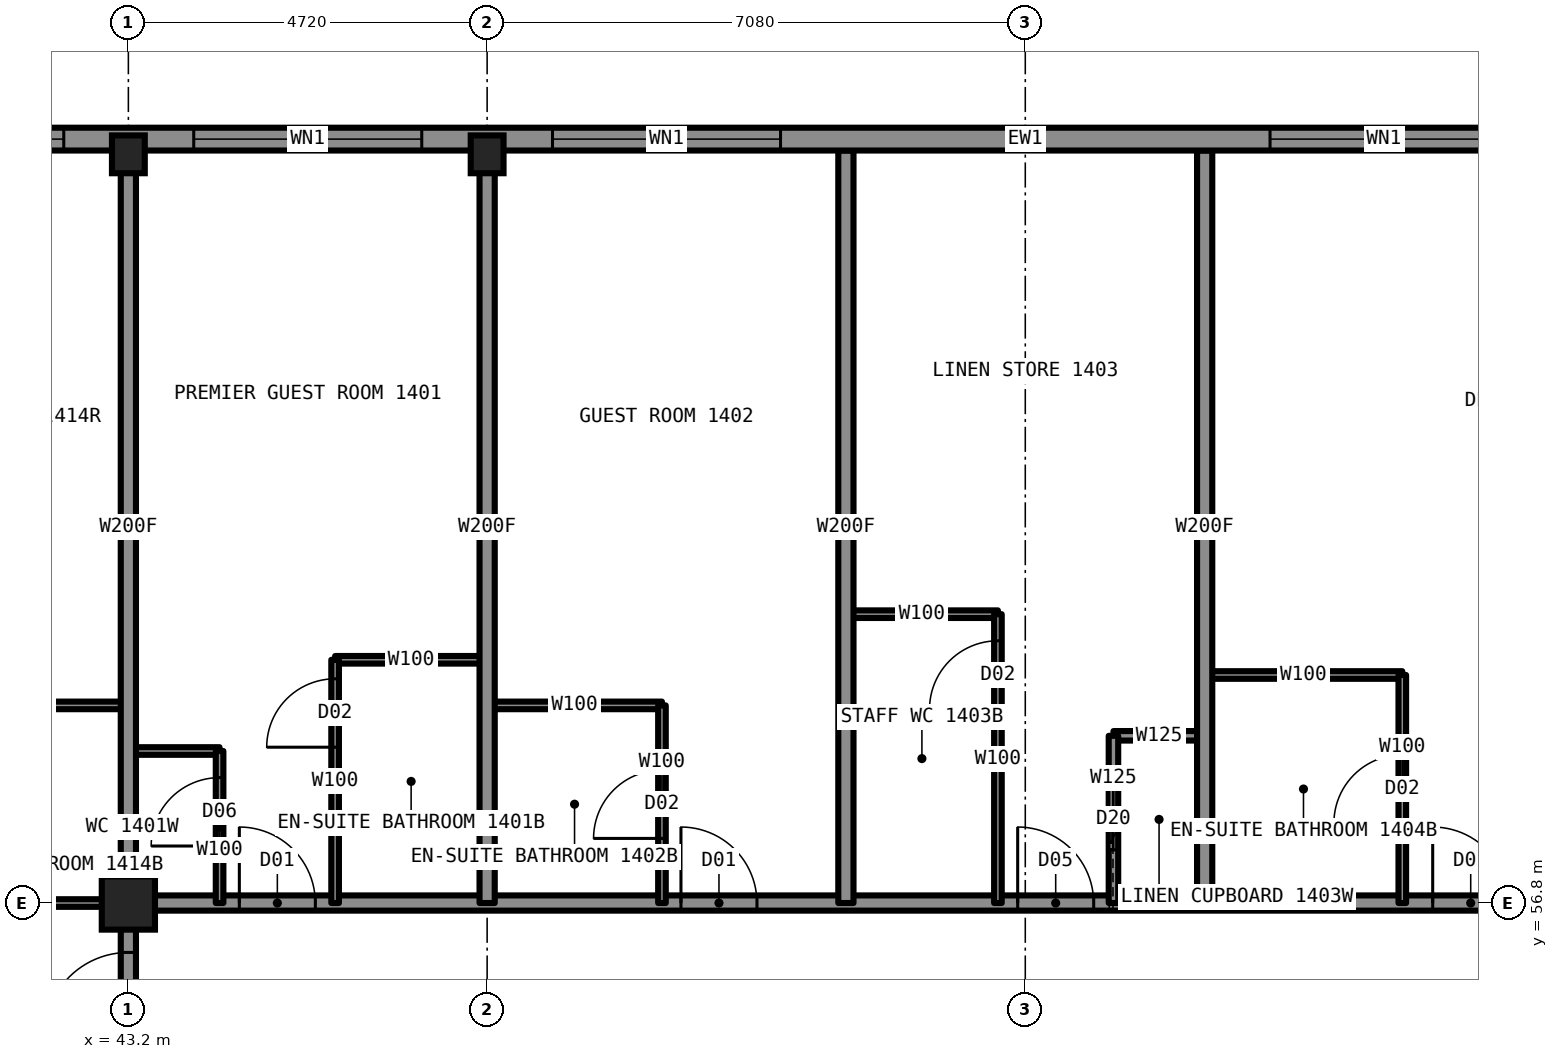
"""IFC4 building model, lengths in metres.
Left out: names, types, materials, properties, quantities, classifications, styles, units other than length and angle.
Written with IfcOpenShell. Run it as: python <this file> out.ifc"""

import sys

from ifc_helpers import new_model, si_unit, direction, frame, frame_2d, origin, origin_2d, place, context, subcontext, project, spatial, rectangle, hollow_rectangle, i_section, extrude, element, fill, save


model = new_model("IFC4")
c1 = context("Model", 3, precision=1e-05, world=origin(), true_north=direction((0.0, 1.0)))
c2 = subcontext(c1, "Body", "Model", "MODEL_VIEW")
j1 = project(units=[si_unit("LENGTHUNIT", "METRE"), si_unit("PLANEANGLEUNIT", "RADIAN")], contexts=[c1])
p1 = place(None, origin())
s1 = spatial("IfcSite", under=j1, at=p1, CompositionType="ELEMENT")
p2 = place(p1, origin())
s2 = spatial("IfcBuilding", under=s1, at=p2, CompositionType="ELEMENT")
p3 = place(p2, frame((0.0, 0.0, 49.5)))
s3 = spatial("IfcBuildingStorey", under=s2, at=p3, CompositionType="ELEMENT", Elevation=49.5)
for number, where, z_axis, x_axis in (
    (1, (43.2, 66.65, 0.0), (0.0, 0.0, 1.0), (1.0, 0.0, 0.0)),
    (2, (47.92, 66.65, 0.0), (0.0, 0.0, 1.0), (1.0, 0.0, 0.0)),
):
    element("IfcColumn", number, at=place(p3, frame(where, z_axis=z_axis, x_axis=x_axis)), inside=s3, PredefinedType="COLUMN", context=c2, shape_type="SweptSolid", body=[
        extrude(i_section(OverallWidth=0.432, OverallDepth=0.498, WebThickness=0.056, FlangeThickness=0.089, at=origin_2d()), origin(), (0.0, 0.0, 1.0), 3.5),
    ])
p4 = place(p3, frame((43.2, 56.8, 0.0), z_axis=(0.0, 0.0, 1.0), x_axis=(1.0, 0.0, 0.0)))
e3 = element("IfcColumn", 3, at=p4, inside=s3, PredefinedType="COLUMN", context=c2, shape_type="SweptSolid", body=[
    extrude(hollow_rectangle(XDim=0.7, YDim=0.7, WallThickness=0.06, at=origin_2d()), origin(), (0.0, 0.0, 1.0), 3.5),
])
p5 = place(p3, frame((40.6, 56.8, 0.0), z_axis=(0.0, 0.0, 1.0), x_axis=(1.0, 0.0, 0.0)))
e4 = element("IfcWall", 4, at=p5, inside=s3, PredefinedType="PARTITIONING", context=c2, shape_type="SweptSolid", body=[
    extrude(rectangle(XDim=2.6, YDim=0.1, at=frame_2d((1.3, 0.0))), origin(), (0.0, 0.0, 1.0), 2.573),
])
p6 = place(p3, frame((43.2, 56.8, 0.0), z_axis=(0.0, 0.0, 1.0), x_axis=(1.0, 0.0, 0.0)))
e5 = element("IfcWall", 5, at=p6, inside=s3, PredefinedType="PARTITIONING", context=c2, shape_type="SweptSolid", body=[
    extrude(rectangle(XDim=23.6, YDim=0.2, at=frame_2d((11.8, 0.0))), origin(), (0.0, 0.0, 1.0), 3.33),
])
p7 = place(p6, frame((1.46, 0.0, 0.0)))
e6 = element("IfcOpeningElement", 6, at=p7, cuts=e5, PredefinedType="OPENING", context=c2, shape_type="SweptSolid", body=[
    extrude(rectangle(XDim=1.0, YDim=2.2, at=frame_2d((0.5, 1.1))), frame((0.0, 0.11, 0.0), z_axis=(0.0, -1.0, 0.0), x_axis=(1.0, 0.0, 0.0)), (0.0, 0.0, 1.0), 0.22),
])
p8 = place(p6, frame((7.27, 0.0, 0.0)))
e7 = element("IfcOpeningElement", 7, at=p8, cuts=e5, PredefinedType="OPENING", context=c2, shape_type="SweptSolid", body=[
    extrude(rectangle(XDim=1.0, YDim=2.2, at=frame_2d((0.5, 1.1))), frame((0.0, 0.11, 0.0), z_axis=(0.0, -1.0, 0.0), x_axis=(1.0, 0.0, 0.0)), (0.0, 0.0, 1.0), 0.22),
])
p9 = place(p6, frame((11.7, 0.0, 0.0)))
e8 = element("IfcOpeningElement", 8, at=p9, cuts=e5, PredefinedType="OPENING", context=c2, shape_type="SweptSolid", body=[
    extrude(rectangle(XDim=1.0, YDim=2.2, at=frame_2d((0.5, 1.1))), frame((0.0, 0.11, 0.0), z_axis=(0.0, -1.0, 0.0), x_axis=(1.0, 0.0, 0.0)), (0.0, 0.0, 1.0), 0.22),
])
p10 = place(p6, frame((17.16, 0.0, 0.0)))
e9 = element("IfcOpeningElement", 9, at=p10, cuts=e5, PredefinedType="OPENING", context=c2, shape_type="SweptSolid", body=[
    extrude(rectangle(XDim=1.0, YDim=2.2, at=frame_2d((0.5, 1.1))), frame((0.0, 0.11, 0.0), z_axis=(0.0, -1.0, 0.0), x_axis=(1.0, 0.0, 0.0)), (0.0, 0.0, 1.0), 0.22),
])
p11 = place(p3, frame((43.2, 58.8, 0.0), z_axis=(0.0, 0.0, 1.0), x_axis=(1.0, 0.0, 0.0)))
e10 = element("IfcWall", 10, at=p11, inside=s3, PredefinedType="PARTITIONING", context=c2, shape_type="SweptSolid", body=[
    extrude(rectangle(XDim=1.2, YDim=0.1, at=frame_2d((0.6, 0.0))), origin(), (0.0, 0.0, 1.0), 3.33),
])
p12 = place(p3, frame((56.16, 59.0, 0.0), z_axis=(0.0, 0.0, 1.0), x_axis=(1.0, 0.0, 0.0)))
e11 = element("IfcWall", 11, at=p12, inside=s3, PredefinedType="PARTITIONING", context=c2, shape_type="SweptSolid", body=[
    extrude(rectangle(XDim=1.2, YDim=0.125, at=frame_2d((0.6, 0.0))), origin(), (0.0, 0.0, 1.0), 3.33),
])
p13 = place(p3, frame((40.6, 59.4, 0.0), z_axis=(0.0, 0.0, 1.0), x_axis=(1.0, 0.0, 0.0)))
e12 = element("IfcWall", 12, at=p13, inside=s3, PredefinedType="PARTITIONING", context=c2, shape_type="SweptSolid", body=[
    extrude(rectangle(XDim=2.6, YDim=0.1, at=frame_2d((1.3, 0.0))), origin(), (0.0, 0.0, 1.0), 3.33),
])
p14 = place(p3, frame((47.92, 59.4, 0.0), z_axis=(0.0, 0.0, 1.0), x_axis=(1.0, 0.0, 0.0)))
e13 = element("IfcWall", 13, at=p14, inside=s3, PredefinedType="PARTITIONING", context=c2, shape_type="SweptSolid", body=[
    extrude(rectangle(XDim=2.3, YDim=0.1, at=frame_2d((1.15, 0.0))), origin(), (0.0, 0.0, 1.0), 3.33),
])
p15 = place(p3, frame((57.36, 59.8, 0.0), z_axis=(0.0, 0.0, 1.0), x_axis=(1.0, 0.0, 0.0)))
e14 = element("IfcWall", 14, at=p15, inside=s3, PredefinedType="PARTITIONING", context=c2, shape_type="SweptSolid", body=[
    extrude(rectangle(XDim=2.6, YDim=0.1, at=frame_2d((1.3, 0.0))), origin(), (0.0, 0.0, 1.0), 3.33),
])
for number, where, z_axis, x_axis in (
    (15, (45.92, 60.0, 0.0), (0.0, 0.0, 1.0), (1.0, 0.0, 0.0)),
    (16, (52.64, 60.6, 0.0), (0.0, 0.0, 1.0), (1.0, 0.0, 0.0)),
):
    element("IfcWall", number, at=place(p3, frame(where, z_axis=z_axis, x_axis=x_axis)), inside=s3, PredefinedType="PARTITIONING", context=c2, shape_type="SweptSolid", body=[
        extrude(rectangle(XDim=2.0, YDim=0.1, at=frame_2d((1.0, 0.0))), origin(), (0.0, 0.0, 1.0), 3.33),
    ])
p16 = place(p3, frame((54.64, 56.8, 0.0), z_axis=(0.0, 0.0, 1.0), x_axis=(0.0, 1.0, 0.0)))
e17 = element("IfcWall", 17, at=p16, inside=s3, PredefinedType="PARTITIONING", context=c2, shape_type="SweptSolid", body=[
    extrude(rectangle(XDim=3.8, YDim=0.1, at=frame_2d((1.9, 0.0))), origin(), (0.0, 0.0, 1.0), 3.33),
])
p17 = place(p16, frame((2.55, 0.0, 0.0)))
e18 = element("IfcOpeningElement", 18, at=p17, cuts=e17, PredefinedType="OPENING", context=c2, shape_type="SweptSolid", body=[
    extrude(rectangle(XDim=0.9, YDim=2.1, at=frame_2d((0.45, 1.05))), frame((0.0, 0.06, 0.0), z_axis=(0.0, -1.0, 0.0), x_axis=(1.0, 0.0, 0.0)), (0.0, 0.0, 1.0), 0.12),
])
p18 = place(p3, frame((44.4, 56.8, 0.0), z_axis=(0.0, 0.0, 1.0), x_axis=(0.0, 1.0, 0.0)))
e19 = element("IfcWall", 19, at=p18, inside=s3, PredefinedType="PARTITIONING", context=c2, shape_type="SweptSolid", body=[
    extrude(rectangle(XDim=2.0, YDim=0.1, at=frame_2d((1.0, 0.0))), origin(), (0.0, 0.0, 1.0), 3.33),
])
p19 = place(p18, frame((0.75, 0.0, 0.0)))
e20 = element("IfcOpeningElement", 20, at=p19, cuts=e19, PredefinedType="OPENING", context=c2, shape_type="SweptSolid", body=[
    extrude(rectangle(XDim=0.9, YDim=2.1, at=frame_2d((0.45, 1.05))), frame((0.0, 0.06, 0.0), z_axis=(0.0, -1.0, 0.0), x_axis=(1.0, 0.0, 0.0)), (0.0, 0.0, 1.0), 0.12),
])
p20 = place(p3, frame((43.2, 52.08, 0.0), z_axis=(0.0, 0.0, 1.0), x_axis=(0.0, 1.0, 0.0)))
e21 = element("IfcWall", 21, at=p20, inside=s3, PredefinedType="PARTITIONING", context=c2, shape_type="SweptSolid", body=[
    extrude(rectangle(XDim=4.72, YDim=0.2, at=frame_2d((2.36, 0.0))), origin(), (0.0, 0.0, 1.0), 3.33),
])
p21 = place(p20, frame((2.97, 0.0, 0.0)))
e22 = element("IfcOpeningElement", 22, at=p21, cuts=e21, PredefinedType="OPENING", context=c2, shape_type="SweptSolid", body=[
    extrude(rectangle(XDim=1.1, YDim=2.2, at=frame_2d((0.55, 1.1))), frame((0.0, 0.11, 0.0), z_axis=(0.0, -1.0, 0.0), x_axis=(1.0, 0.0, 0.0)), (0.0, 0.0, 1.0), 0.22),
])
p22 = place(p3, frame((43.2, 56.8, 0.0), z_axis=(0.0, 0.0, 1.0), x_axis=(0.0, 1.0, 0.0)))
e23 = element("IfcWall", 23, at=p22, inside=s3, PredefinedType="PARTITIONING", context=c2, shape_type="SweptSolid", body=[
    extrude(rectangle(XDim=9.9, YDim=0.2, at=frame_2d((4.95, 0.0))), origin(), (0.0, 0.0, 1.0), 2.573),
])
p23 = place(p3, frame((52.64, 56.8, 0.0), z_axis=(0.0, 0.0, 1.0), x_axis=(0.0, 1.0, 0.0)))
e24 = element("IfcWall", 24, at=p23, inside=s3, PredefinedType="PARTITIONING", context=c2, shape_type="SweptSolid", body=[
    extrude(rectangle(XDim=9.9, YDim=0.2, at=frame_2d((4.95, 0.0))), origin(), (0.0, 0.0, 1.0), 3.33),
])
p24 = place(p3, frame((50.22, 56.8, 0.0), z_axis=(0.0, 0.0, 1.0), x_axis=(0.0, 1.0, 0.0)))
e25 = element("IfcWall", 25, at=p24, inside=s3, PredefinedType="PARTITIONING", context=c2, shape_type="SweptSolid", body=[
    extrude(rectangle(XDim=2.6, YDim=0.1, at=frame_2d((1.3, 0.0))), origin(), (0.0, 0.0, 1.0), 3.33),
])
p25 = place(p24, frame((0.85, 0.0, 0.0)))
e26 = element("IfcOpeningElement", 26, at=p25, cuts=e25, PredefinedType="OPENING", context=c2, shape_type="SweptSolid", body=[
    extrude(rectangle(XDim=0.9, YDim=2.1, at=frame_2d((0.45, 1.05))), frame((0.0, 0.06, 0.0), z_axis=(0.0, -1.0, 0.0), x_axis=(1.0, 0.0, 0.0)), (0.0, 0.0, 1.0), 0.12),
])
p26 = place(p3, frame((47.92, 56.8, 0.0), z_axis=(0.0, 0.0, 1.0), x_axis=(0.0, 1.0, 0.0)))
e27 = element("IfcWall", 27, at=p26, inside=s3, PredefinedType="PARTITIONING", context=c2, shape_type="SweptSolid", body=[
    extrude(rectangle(XDim=9.9, YDim=0.2, at=frame_2d((4.95, 0.0))), origin(), (0.0, 0.0, 1.0), 2.573),
])
p27 = place(p3, frame((45.92, 56.8, 0.0), z_axis=(0.0, 0.0, 1.0), x_axis=(0.0, 1.0, 0.0)))
e28 = element("IfcWall", 28, at=p27, inside=s3, PredefinedType="PARTITIONING", context=c2, shape_type="SweptSolid", body=[
    extrude(rectangle(XDim=3.2, YDim=0.1, at=frame_2d((1.6, 0.0))), origin(), (0.0, 0.0, 1.0), 3.33),
])
p28 = place(p27, frame((2.05, 0.0, 0.0)))
e29 = element("IfcOpeningElement", 29, at=p28, cuts=e28, PredefinedType="OPENING", context=c2, shape_type="SweptSolid", body=[
    extrude(rectangle(XDim=0.9, YDim=2.1, at=frame_2d((0.45, 1.05))), frame((0.0, 0.06, 0.0), z_axis=(0.0, -1.0, 0.0), x_axis=(1.0, 0.0, 0.0)), (0.0, 0.0, 1.0), 0.12),
])
p29 = place(p3, frame((56.16, 56.8, 0.0), z_axis=(0.0, 0.0, 1.0), x_axis=(0.0, 1.0, 0.0)))
e30 = element("IfcWall", 30, at=p29, inside=s3, PredefinedType="PARTITIONING", context=c2, shape_type="SweptSolid", body=[
    extrude(rectangle(XDim=2.2, YDim=0.125, at=frame_2d((1.1, 0.0))), origin(), (0.0, 0.0, 1.0), 3.33),
])
p30 = place(p29, frame((0.7, 0.0, 0.0)))
e31 = element("IfcOpeningElement", 31, at=p30, cuts=e30, PredefinedType="OPENING", context=c2, shape_type="SweptSolid", body=[
    extrude(rectangle(XDim=0.8, YDim=2.1, at=frame_2d((0.4, 1.05))), frame((0.0, 0.073, 0.0), z_axis=(0.0, -1.0, 0.0), x_axis=(1.0, 0.0, 0.0)), (0.0, 0.0, 1.0), 0.145),
])
p31 = place(p3, frame((57.36, 56.8, 0.0), z_axis=(0.0, 0.0, 1.0), x_axis=(0.0, 1.0, 0.0)))
e32 = element("IfcWall", 32, at=p31, inside=s3, PredefinedType="PARTITIONING", context=c2, shape_type="SweptSolid", body=[
    extrude(rectangle(XDim=9.9, YDim=0.2, at=frame_2d((4.95, 0.0))), origin(), (0.0, 0.0, 1.0), 3.33),
])
p32 = place(p3, frame((59.96, 56.8, 0.0), z_axis=(0.0, 0.0, 1.0), x_axis=(0.0, 1.0, 0.0)))
e33 = element("IfcWall", 33, at=p32, inside=s3, PredefinedType="PARTITIONING", context=c2, shape_type="SweptSolid", body=[
    extrude(rectangle(XDim=3.0, YDim=0.1, at=frame_2d((1.5, 0.0))), origin(), (0.0, 0.0, 1.0), 3.33),
])
p33 = place(p32, frame((1.05, 0.0, 0.0)))
e34 = element("IfcOpeningElement", 34, at=p33, cuts=e33, PredefinedType="OPENING", context=c2, shape_type="SweptSolid", body=[
    extrude(rectangle(XDim=0.9, YDim=2.1, at=frame_2d((0.45, 1.05))), frame((0.0, 0.06, 0.0), z_axis=(0.0, -1.0, 0.0), x_axis=(1.0, 0.0, 0.0)), (0.0, 0.0, 1.0), 0.12),
])
p34 = place(p3, frame((71.5, 66.85, 0.0), z_axis=(0.0, 0.0, 1.0), x_axis=(-1.0, 0.0, 0.0)))
e35 = element("IfcWall", 35, at=p34, inside=s3, PredefinedType="SOLIDWALL", context=c2, shape_type="SweptSolid", body=[
    extrude(rectangle(XDim=33.0, YDim=0.3, at=frame_2d((16.5, 0.0))), origin(), (0.0, 0.0, 1.0), 2.83),
])
p35 = place(p34, frame((0.85, 0.0, 0.5)))
e36 = element("IfcOpeningElement", 36, at=p35, cuts=e35, PredefinedType="OPENING", context=c2, shape_type="SweptSolid", body=[
    extrude(rectangle(XDim=3.0, YDim=2.0, at=frame_2d((1.5, 1.0))), frame((0.0, 0.16, 0.0), z_axis=(0.0, -1.0, 0.0), x_axis=(1.0, 0.0, 0.0)), (0.0, 0.0, 1.0), 0.32),
])
p36 = place(p34, frame((5.56, 0.0, 0.5)))
e37 = element("IfcOpeningElement", 37, at=p36, cuts=e35, PredefinedType="OPENING", context=c2, shape_type="SweptSolid", body=[
    extrude(rectangle(XDim=3.0, YDim=2.0, at=frame_2d((1.5, 1.0))), frame((0.0, 0.16, 0.0), z_axis=(0.0, -1.0, 0.0), x_axis=(1.0, 0.0, 0.0)), (0.0, 0.0, 1.0), 0.32),
])
p37 = place(p34, frame((10.28, 0.0, 1.1)))
e38 = element("IfcOpeningElement", 38, at=p37, cuts=e35, PredefinedType="OPENING", context=c2, shape_type="SweptSolid", body=[
    extrude(rectangle(XDim=1.1, YDim=1.4, at=frame_2d((0.55, 0.7))), frame((0.0, 0.16, 0.0), z_axis=(0.0, -1.0, 0.0), x_axis=(1.0, 0.0, 0.0)), (0.0, 0.0, 1.0), 0.32),
])
p38 = place(p34, frame((15.0, 0.0, 0.5)))
e39 = element("IfcOpeningElement", 39, at=p38, cuts=e35, PredefinedType="OPENING", context=c2, shape_type="SweptSolid", body=[
    extrude(rectangle(XDim=3.0, YDim=2.0, at=frame_2d((1.5, 1.0))), frame((0.0, 0.16, 0.0), z_axis=(0.0, -1.0, 0.0), x_axis=(1.0, 0.0, 0.0)), (0.0, 0.0, 1.0), 0.32),
])
p39 = place(p34, frame((21.62, 0.0, 1.1)))
e40 = element("IfcOpeningElement", 40, at=p39, cuts=e35, PredefinedType="OPENING", context=c2, shape_type="SweptSolid", body=[
    extrude(rectangle(XDim=1.1, YDim=1.4, at=frame_2d((0.55, 0.7))), frame((0.0, 0.16, 0.0), z_axis=(0.0, -1.0, 0.0), x_axis=(1.0, 0.0, 0.0)), (0.0, 0.0, 1.0), 0.32),
])
p40 = place(p34, frame((24.44, 0.0, 0.5)))
e41 = element("IfcOpeningElement", 41, at=p40, cuts=e35, PredefinedType="OPENING", context=c2, shape_type="SweptSolid", body=[
    extrude(rectangle(XDim=3.0, YDim=2.0, at=frame_2d((1.5, 1.0))), frame((0.0, 0.16, 0.0), z_axis=(0.0, -1.0, 0.0), x_axis=(1.0, 0.0, 0.0)), (0.0, 0.0, 1.0), 0.32),
])
p41 = place(p34, frame((29.15, 0.0, 0.5)))
e42 = element("IfcOpeningElement", 42, at=p41, cuts=e35, PredefinedType="OPENING", context=c2, shape_type="SweptSolid", body=[
    extrude(rectangle(XDim=3.0, YDim=2.0, at=frame_2d((1.5, 1.0))), frame((0.0, 0.16, 0.0), z_axis=(0.0, -1.0, 0.0), x_axis=(1.0, 0.0, 0.0)), (0.0, 0.0, 1.0), 0.32),
])
p42 = place(p7, origin())
e43 = element("IfcDoor", 43, at=p42, inside=s3, OperationType="SINGLE_SWING_LEFT", PredefinedType="DOOR", context=c2, shape_type="SweptSolid", body=[
    extrude(rectangle(XDim=1.0, YDim=2.2, at=frame_2d((0.5, 1.1))), frame((0.0, 0.025, 0.0), z_axis=(0.0, -1.0, 0.0), x_axis=(1.0, 0.0, 0.0)), (0.0, 0.0, 1.0), 0.05),
])
fill(e6, e43)
p43 = place(p28, origin())
e44 = element("IfcDoor", 44, at=p43, inside=s3, OperationType="SINGLE_SWING_RIGHT", PredefinedType="DOOR", context=c2, shape_type="SweptSolid", body=[
    extrude(rectangle(XDim=0.9, YDim=2.1, at=frame_2d((0.45, 1.05))), frame((0.0, 0.025, 0.0), z_axis=(0.0, -1.0, 0.0), x_axis=(1.0, 0.0, 0.0)), (0.0, 0.0, 1.0), 0.05),
])
fill(e29, e44)
p44 = place(p19, origin())
e45 = element("IfcDoor", 45, at=p44, inside=s3, OperationType="SINGLE_SWING_LEFT", PredefinedType="DOOR", context=c2, shape_type="SweptSolid", body=[
    extrude(rectangle(XDim=0.9, YDim=2.1, at=frame_2d((0.45, 1.05))), frame((0.0, 0.025, 0.0), z_axis=(0.0, -1.0, 0.0), x_axis=(1.0, 0.0, 0.0)), (0.0, 0.0, 1.0), 0.05),
])
fill(e20, e45)
p45 = place(p8, origin())
e46 = element("IfcDoor", 46, at=p45, inside=s3, OperationType="SINGLE_SWING_LEFT", PredefinedType="DOOR", context=c2, shape_type="SweptSolid", body=[
    extrude(rectangle(XDim=1.0, YDim=2.2, at=frame_2d((0.5, 1.1))), frame((0.0, 0.025, 0.0), z_axis=(0.0, -1.0, 0.0), x_axis=(1.0, 0.0, 0.0)), (0.0, 0.0, 1.0), 0.05),
])
fill(e7, e46)
p46 = place(p25, origin())
e47 = element("IfcDoor", 47, at=p46, inside=s3, OperationType="SINGLE_SWING_RIGHT", PredefinedType="DOOR", context=c2, shape_type="SweptSolid", body=[
    extrude(rectangle(XDim=0.9, YDim=2.1, at=frame_2d((0.45, 1.05))), frame((0.0, 0.025, 0.0), z_axis=(0.0, -1.0, 0.0), x_axis=(1.0, 0.0, 0.0)), (0.0, 0.0, 1.0), 0.05),
])
fill(e26, e47)
p47 = place(p9, origin())
e48 = element("IfcDoor", 48, at=p47, inside=s3, OperationType="SINGLE_SWING_LEFT", PredefinedType="DOOR", context=c2, shape_type="SweptSolid", body=[
    extrude(rectangle(XDim=1.0, YDim=2.2, at=frame_2d((0.5, 1.1))), frame((0.0, 0.025, 0.0), z_axis=(0.0, -1.0, 0.0), x_axis=(1.0, 0.0, 0.0)), (0.0, 0.0, 1.0), 0.05),
])
fill(e8, e48)
p48 = place(p17, origin())
e49 = element("IfcDoor", 49, at=p48, inside=s3, OperationType="SINGLE_SWING_RIGHT", PredefinedType="DOOR", context=c2, shape_type="SweptSolid", body=[
    extrude(rectangle(XDim=0.9, YDim=2.1, at=frame_2d((0.45, 1.05))), frame((0.0, 0.025, 0.0), z_axis=(0.0, -1.0, 0.0), x_axis=(1.0, 0.0, 0.0)), (0.0, 0.0, 1.0), 0.05),
])
fill(e18, e49)
p49 = place(p30, origin())
e50 = element("IfcDoor", 50, at=p49, inside=s3, OperationType="SLIDING_TO_LEFT", PredefinedType="DOOR", context=c2, shape_type="SweptSolid", body=[
    extrude(rectangle(XDim=0.8, YDim=2.1, at=frame_2d((0.4, 1.05))), frame((0.0, 0.025, 0.0), z_axis=(0.0, -1.0, 0.0), x_axis=(1.0, 0.0, 0.0)), (0.0, 0.0, 1.0), 0.05),
])
fill(e31, e50)
p50 = place(p10, origin())
e51 = element("IfcDoor", 51, at=p50, inside=s3, OperationType="SINGLE_SWING_LEFT", PredefinedType="DOOR", context=c2, shape_type="SweptSolid", body=[
    extrude(rectangle(XDim=1.0, YDim=2.2, at=frame_2d((0.5, 1.1))), frame((0.0, 0.025, 0.0), z_axis=(0.0, -1.0, 0.0), x_axis=(1.0, 0.0, 0.0)), (0.0, 0.0, 1.0), 0.05),
])
fill(e9, e51)
p51 = place(p33, origin())
e52 = element("IfcDoor", 52, at=p51, inside=s3, OperationType="SINGLE_SWING_RIGHT", PredefinedType="DOOR", context=c2, shape_type="SweptSolid", body=[
    extrude(rectangle(XDim=0.9, YDim=2.1, at=frame_2d((0.45, 1.05))), frame((0.0, 0.025, 0.0), z_axis=(0.0, -1.0, 0.0), x_axis=(1.0, 0.0, 0.0)), (0.0, 0.0, 1.0), 0.05),
])
fill(e34, e52)
p52 = place(p21, origin())
e53 = element("IfcDoor", 53, at=p52, inside=s3, OperationType="SINGLE_SWING_LEFT", PredefinedType="DOOR", context=c2, shape_type="SweptSolid", body=[
    extrude(rectangle(XDim=1.1, YDim=2.2, at=frame_2d((0.55, 1.1))), frame((0.0, 0.025, 0.0), z_axis=(0.0, -1.0, 0.0), x_axis=(1.0, 0.0, 0.0)), (0.0, 0.0, 1.0), 0.05),
])
fill(e22, e53)
p53 = place(p37, origin())
e54 = element("IfcWindow", 54, at=p53, inside=s3, PartitioningType="SINGLE_PANEL", PredefinedType="WINDOW", context=c2, shape_type="SweptSolid", body=[
    extrude(rectangle(XDim=1.1, YDim=1.4, at=frame_2d((0.55, 0.7))), frame((0.0, 0.03, 0.0), z_axis=(0.0, -1.0, 0.0), x_axis=(1.0, 0.0, 0.0)), (0.0, 0.0, 1.0), 0.06),
])
fill(e38, e54)
p54 = place(p38, origin())
e55 = element("IfcWindow", 55, at=p54, inside=s3, PartitioningType="SINGLE_PANEL", PredefinedType="WINDOW", context=c2, shape_type="SweptSolid", body=[
    extrude(rectangle(XDim=3.0, YDim=2.0, at=frame_2d((1.5, 1.0))), frame((0.0, 0.03, 0.0), z_axis=(0.0, -1.0, 0.0), x_axis=(1.0, 0.0, 0.0)), (0.0, 0.0, 1.0), 0.06),
])
fill(e39, e55)
p55 = place(p39, origin())
e56 = element("IfcWindow", 56, at=p55, inside=s3, PartitioningType="SINGLE_PANEL", PredefinedType="WINDOW", context=c2, shape_type="SweptSolid", body=[
    extrude(rectangle(XDim=1.1, YDim=1.4, at=frame_2d((0.55, 0.7))), frame((0.0, 0.03, 0.0), z_axis=(0.0, -1.0, 0.0), x_axis=(1.0, 0.0, 0.0)), (0.0, 0.0, 1.0), 0.06),
])
fill(e40, e56)
p56 = place(p40, origin())
e57 = element("IfcWindow", 57, at=p56, inside=s3, PartitioningType="SINGLE_PANEL", PredefinedType="WINDOW", context=c2, shape_type="SweptSolid", body=[
    extrude(rectangle(XDim=3.0, YDim=2.0, at=frame_2d((1.5, 1.0))), frame((0.0, 0.03, 0.0), z_axis=(0.0, -1.0, 0.0), x_axis=(1.0, 0.0, 0.0)), (0.0, 0.0, 1.0), 0.06),
])
fill(e41, e57)
p57 = place(p41, origin())
e58 = element("IfcWindow", 58, at=p57, inside=s3, PartitioningType="SINGLE_PANEL", PredefinedType="WINDOW", context=c2, shape_type="SweptSolid", body=[
    extrude(rectangle(XDim=3.0, YDim=2.0, at=frame_2d((1.5, 1.0))), frame((0.0, 0.03, 0.0), z_axis=(0.0, -1.0, 0.0), x_axis=(1.0, 0.0, 0.0)), (0.0, 0.0, 1.0), 0.06),
])
fill(e42, e58)
save(model, sys.argv[1])
